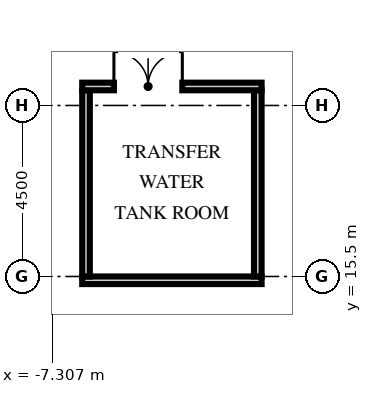
"""IFC4 building model, lengths in metres.
Left out: names, types, materials, properties, quantities, classifications, styles, units other than length and angle.
Written with IfcOpenShell. Run it as: python <this file> out.ifc"""

import sys

from ifc_helpers import new_model, si_unit, direction, frame, frame_2d, origin, origin_2d, place, context, subcontext, project, spatial, rectangle, extrude, element, fill, save


model = new_model("IFC4")
c1 = context("Model", 3, precision=1e-05, world=origin(), true_north=direction((0.0, 1.0)))
c2 = subcontext(c1, "Body", "Model", "MODEL_VIEW")
j1 = project(units=[si_unit("LENGTHUNIT", "METRE"), si_unit("PLANEANGLEUNIT", "RADIAN")], contexts=[c1])
p1 = place(None, origin())
s1 = spatial("IfcSite", under=j1, at=p1, CompositionType="ELEMENT")
p2 = place(p1, origin())
s2 = spatial("IfcBuilding", under=s1, at=p2, CompositionType="ELEMENT")
p3 = place(p2, frame((0.0, 0.0, 278.25)))
s3 = spatial("IfcBuildingStorey", under=s2, at=p3, CompositionType="ELEMENT", Elevation=278.25)
p4 = place(p3, frame((-8.32, 24.4, -0.65), z_axis=(0.103601510687, -0.332963994967, 0.937230870724), x_axis=(0.994618884766, 0.034712905596, -0.097612951251)))
e1 = element("IfcColumn", 1, at=p4, inside=s3, PredefinedType="COLUMN", context=c2, shape_type="SweptSolid", body=[
    extrude(rectangle(XDim=2.8, YDim=1.8, at=origin_2d()), origin(), (0.0, 0.0, 1.0), 8.109),
])
p5 = place(p3, frame((0.0, 24.4, -0.65), z_axis=(0.0, -0.334765406017, 0.942301503201), x_axis=(1.0, 0.0, 0.0)))
e2 = element("IfcColumn", 2, at=p5, inside=s3, PredefinedType="COLUMN", context=c2, shape_type="SweptSolid", body=[
    extrude(rectangle(XDim=2.8, YDim=1.8, at=origin_2d()), origin(), (0.0, 0.0, 1.0), 8.065),
])
p6 = place(p3, frame((-6.52, 15.4, 0.0), z_axis=(0.0, 0.0, 1.0), x_axis=(1.0, 0.0, 0.0)))
e3 = element("IfcWall", 3, at=p6, inside=s3, PredefinedType="SOLIDWALL", context=c2, shape_type="SweptSolid", body=[
    extrude(rectangle(XDim=4.72, YDim=0.2, at=frame_2d((2.36, 0.0))), origin(), (0.0, 0.0, 1.0), 6.56),
])
for number, where, z_axis, x_axis in (
    (4, (-6.42, 15.5, 0.0), (0.0, 0.0, 1.0), (0.0, 1.0, 0.0)),
    (5, (-1.9, 15.5, 0.0), (0.0, 0.0, 1.0), (0.0, 1.0, 0.0)),
):
    element("IfcWall", number, at=place(p3, frame(where, z_axis=z_axis, x_axis=x_axis)), inside=s3, PredefinedType="SOLIDWALL", context=c2, shape_type="SweptSolid", body=[
        extrude(rectangle(XDim=4.9, YDim=0.2, at=frame_2d((2.45, 0.0))), origin(), (0.0, 0.0, 1.0), 7.25),
    ])
p7 = place(p3, frame((-6.52, 20.5, 0.0), z_axis=(0.0, 0.0, 1.0), x_axis=(1.0, 0.0, 0.0)))
e6 = element("IfcWall", 6, at=p7, inside=s3, PredefinedType="SOLIDWALL", context=c2, shape_type="SweptSolid", body=[
    extrude(rectangle(XDim=4.72, YDim=0.2, at=frame_2d((2.36, 0.0))), origin(), (0.0, 0.0, 1.0), 6.56),
])
p8 = place(p7, frame((0.834, 0.0, 0.0)))
e7 = element("IfcOpeningElement", 7, at=p8, cuts=e6, PredefinedType="OPENING", context=c2, shape_type="SweptSolid", body=[
    extrude(rectangle(XDim=1.8, YDim=2.4, at=frame_2d((0.9, 1.2))), frame((0.0, 0.11, 0.0), z_axis=(0.0, -1.0, 0.0), x_axis=(1.0, 0.0, 0.0)), (0.0, 0.0, 1.0), 0.22),
])
p9 = place(p8, origin())
e8 = element("IfcDoor", 8, at=p9, inside=s3, OperationType="DOUBLE_DOOR_SINGLE_SWING", PredefinedType="DOOR", context=c2, shape_type="SweptSolid", body=[
    extrude(rectangle(XDim=1.8, YDim=2.4, at=frame_2d((0.9, 1.2))), frame((0.0, 0.025, 0.0), z_axis=(0.0, -1.0, 0.0), x_axis=(1.0, 0.0, 0.0)), (0.0, 0.0, 1.0), 0.05),
])
fill(e7, e8)
save(model, sys.argv[1])
